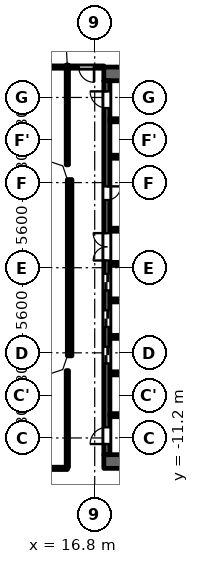
"""IFC4 building model, lengths in metres.
Left out: names, types, materials, properties, quantities, classifications, styles, units other than length and angle.
Written with IfcOpenShell. Run it as: python <this file> out.ifc"""

import sys

from ifc_helpers import new_model, si_unit, direction, frame, frame_2d, origin, place, context, subcontext, project, spatial, polyline, rectangle, outline, extrude, element, fill, save


model = new_model("IFC4")
c1 = context("Model", 3, precision=1e-05, world=origin(), true_north=direction((0.0, 1.0)))
c2 = subcontext(c1, "Body", "Model", "MODEL_VIEW")
j1 = project(units=[si_unit("LENGTHUNIT", "METRE"), si_unit("PLANEANGLEUNIT", "RADIAN")], contexts=[c1])
p1 = place(None, origin())
s1 = spatial("IfcSite", under=j1, at=p1, CompositionType="ELEMENT")
p2 = place(p1, origin())
s2 = spatial("IfcBuilding", under=s1, at=p2, CompositionType="ELEMENT")
p3 = place(p2, frame((0.0, 0.0, 6.5)))
s3 = spatial("IfcBuildingStorey", under=s2, at=p3, CompositionType="ELEMENT", Elevation=6.5)
p4 = place(p3, frame((15.15, 5.8, 0.0), z_axis=(0.0, 0.0, 1.0), x_axis=(0.0, -1.0, 0.0)))
e1 = element("IfcWall", 1, at=p4, inside=s3, PredefinedType="SOLIDWALL", context=c2, shape_type="SweptSolid", body=[
    extrude(rectangle(XDim=11.6, YDim=0.3, at=frame_2d((5.8, 0.0))), origin(), (0.0, 0.0, 1.0), 4.45),
])
for number, where, z_axis, x_axis in (
    (2, (17.4, 12.75, 0.0), (0.0, 0.0, 1.0), (1.0, 0.0, 0.0)),
    (3, (17.4, -12.75, 0.0), (0.0, 0.0, 1.0), (1.0, 0.0, 0.0)),
):
    element("IfcWall", number, at=place(p3, frame(where, z_axis=z_axis, x_axis=x_axis)), inside=s3, PredefinedType="SHEAR", context=c2, shape_type="SweptSolid", body=[
        extrude(rectangle(XDim=10.4, YDim=0.9, at=frame_2d((5.2, 0.0))), origin(), (0.0, 0.0, 1.0), 4.45),
    ])
p5 = place(p3, frame((17.6, -12.3, 0.0), z_axis=(0.0, 0.0, 1.0), x_axis=(0.0, 1.0, 0.0)))
e4 = element("IfcWall", 4, at=p5, inside=s3, PredefinedType="SHEAR", context=c2, shape_type="SweptSolid", body=[
    extrude(rectangle(XDim=24.6, YDim=0.4, at=frame_2d((12.3, 0.0))), origin(), (0.0, 0.0, 1.0), 4.45),
])
p6 = place(p5, frame((6.0, 0.0, 0.0)))
e5 = element("IfcOpeningElement", 5, at=p6, cuts=e4, PredefinedType="OPENING", context=c2, shape_type="SweptSolid", body=[
    extrude(rectangle(XDim=1.1, YDim=2.1, at=frame_2d((0.55, 1.05))), frame((0.0, 0.21, 0.0), z_axis=(0.0, -1.0, 0.0), x_axis=(1.0, 0.0, 0.0)), (0.0, 0.0, 1.0), 0.42),
])
p7 = place(p5, frame((8.4, 0.0, 0.0)))
e6 = element("IfcOpeningElement", 6, at=p7, cuts=e4, PredefinedType="OPENING", context=c2, shape_type="SweptSolid", body=[
    extrude(rectangle(XDim=1.1, YDim=2.1, at=frame_2d((0.55, 1.05))), frame((0.0, 0.21, 0.0), z_axis=(0.0, -1.0, 0.0), x_axis=(1.0, 0.0, 0.0)), (0.0, 0.0, 1.0), 0.42),
])
p8 = place(p5, frame((10.8, 0.0, 0.0)))
e7 = element("IfcOpeningElement", 7, at=p8, cuts=e4, PredefinedType="OPENING", context=c2, shape_type="SweptSolid", body=[
    extrude(rectangle(XDim=1.1, YDim=2.1, at=frame_2d((0.55, 1.05))), frame((0.0, 0.21, 0.0), z_axis=(0.0, -1.0, 0.0), x_axis=(1.0, 0.0, 0.0)), (0.0, 0.0, 1.0), 0.42),
])
p9 = place(p5, frame((16.75, 0.0, 0.0)))
e8 = element("IfcOpeningElement", 8, at=p9, cuts=e4, PredefinedType="OPENING", context=c2, shape_type="SweptSolid", body=[
    extrude(rectangle(XDim=0.9, YDim=2.1, at=frame_2d((0.45, 1.05))), frame((0.0, 0.21, 0.0), z_axis=(0.0, -1.0, 0.0), x_axis=(1.0, 0.0, 0.0)), (0.0, 0.0, 1.0), 0.42),
])
p10 = place(p5, frame((22.8, 0.0, 0.0)))
e9 = element("IfcOpeningElement", 9, at=p10, cuts=e4, PredefinedType="OPENING", context=c2, shape_type="SweptSolid", body=[
    extrude(rectangle(XDim=1.1, YDim=2.1, at=frame_2d((0.55, 1.05))), frame((0.0, 0.21, 0.0), z_axis=(0.0, -1.0, 0.0), x_axis=(1.0, 0.0, 0.0)), (0.0, 0.0, 1.0), 0.42),
])
p11 = place(p5, frame((0.7, 0.0, 0.0)))
e10 = element("IfcOpeningElement", 10, at=p11, cuts=e4, PredefinedType="OPENING", context=c2, shape_type="SweptSolid", body=[
    extrude(rectangle(XDim=1.1, YDim=2.1, at=frame_2d((0.55, 1.05))), frame((0.0, 0.21, 0.0), z_axis=(0.0, -1.0, 0.0), x_axis=(1.0, 0.0, 0.0)), (0.0, 0.0, 1.0), 0.42),
])
p12 = place(p5, frame((12.775, 0.0, 0.0)))
e11 = element("IfcOpeningElement", 11, at=p12, cuts=e4, PredefinedType="OPENING", context=c2, shape_type="SweptSolid", body=[
    extrude(rectangle(XDim=1.8, YDim=2.1, at=frame_2d((0.9, 1.05))), frame((0.0, 0.21, 0.0), z_axis=(0.0, -1.0, 0.0), x_axis=(1.0, 0.0, 0.0)), (0.0, 0.0, 1.0), 0.42),
])
p13 = place(p3, frame((17.8, -9.7, 0.0), z_axis=(0.0, 0.0, 1.0), x_axis=(1.0, 0.0, 0.0)))
e12 = element("IfcWall", 12, at=p13, inside=s3, PredefinedType="SHEAR", context=c2, shape_type="SweptSolid", body=[
    extrude(rectangle(XDim=8.3, YDim=0.2, at=frame_2d((4.15, 0.0))), origin(), (0.0, 0.0, 1.0), 4.45),
])
p14 = place(p13, frame((0.85, 0.0, 0.0)))
e13 = element("IfcOpeningElement", 13, at=p14, cuts=e12, PredefinedType="OPENING", context=c2, shape_type="SweptSolid", body=[
    extrude(rectangle(XDim=1.1, YDim=2.1, at=frame_2d((0.55, 1.05))), frame((0.0, 0.11, 0.0), z_axis=(0.0, -1.0, 0.0), x_axis=(1.0, 0.0, 0.0)), (0.0, 0.0, 1.0), 0.22),
])
p15 = place(p13, frame((3.75, 0.0, 0.0)))
e14 = element("IfcOpeningElement", 14, at=p15, cuts=e12, PredefinedType="OPENING", context=c2, shape_type="SweptSolid", body=[
    extrude(rectangle(XDim=1.1, YDim=2.1, at=frame_2d((0.55, 1.05))), frame((0.0, 0.11, 0.0), z_axis=(0.0, -1.0, 0.0), x_axis=(1.0, 0.0, 0.0)), (0.0, 0.0, 1.0), 0.22),
])
for number, where, z_axis, x_axis in (
    (15, (17.8, -6.95, 0.0), (0.0, 0.0, 1.0), (1.0, 0.0, 0.0)),
    (16, (17.8, -4.55, 0.0), (0.0, 0.0, 1.0), (1.0, 0.0, 0.0)),
    (17, (17.8, -2.15, 0.0), (0.0, 0.0, 1.0), (1.0, 0.0, 0.0)),
):
    element("IfcWall", number, at=place(p3, frame(where, z_axis=z_axis, x_axis=x_axis)), inside=s3, PredefinedType="PARTITIONING", context=c2, shape_type="SweptSolid", body=[
        extrude(rectangle(XDim=2.8, YDim=0.2, at=frame_2d((1.4, 0.0))), origin(), (0.0, 0.0, 1.0), 4.45),
    ])
for number, where, z_axis, x_axis in (
    (18, (17.8, 0.25, 0.0), (0.0, 0.0, 1.0), (1.0, 0.0, 0.0)),
    (19, (17.8, 2.5, 0.0), (0.0, 0.0, 1.0), (1.0, 0.0, 0.0)),
):
    element("IfcWall", number, at=place(p3, frame(where, z_axis=z_axis, x_axis=x_axis)), inside=s3, PredefinedType="PARTITIONING", context=c2, shape_type="SweptSolid", body=[
        extrude(rectangle(XDim=3.0, YDim=0.2, at=frame_2d((1.5, 0.0))), origin(), (0.0, 0.0, 1.0), 4.45),
    ])
p16 = place(p3, frame((17.8, 7.3, 0.0), z_axis=(0.0, 0.0, 1.0), x_axis=(1.0, 0.0, 0.0)))
e20 = element("IfcWall", 20, at=p16, inside=s3, PredefinedType="PARTITIONING", context=c2, shape_type="SweptSolid", body=[
    extrude(rectangle(XDim=2.8, YDim=0.2, at=frame_2d((1.4, 0.0))), origin(), (0.0, 0.0, 1.0), 4.45),
])
p17 = place(p3, frame((17.8, 9.7, 0.0), z_axis=(0.0, 0.0, 1.0), x_axis=(1.0, 0.0, 0.0)))
e21 = element("IfcWall", 21, at=p17, inside=s3, PredefinedType="SHEAR", context=c2, shape_type="SweptSolid", body=[
    extrude(rectangle(XDim=8.3, YDim=0.2, at=frame_2d((4.15, 0.0))), origin(), (0.0, 0.0, 1.0), 4.45),
])
p18 = place(p17, frame((0.85, 0.0, 0.0)))
e22 = element("IfcOpeningElement", 22, at=p18, cuts=e21, PredefinedType="OPENING", context=c2, shape_type="SweptSolid", body=[
    extrude(rectangle(XDim=1.1, YDim=2.1, at=frame_2d((0.55, 1.05))), frame((0.0, 0.11, 0.0), z_axis=(0.0, -1.0, 0.0), x_axis=(1.0, 0.0, 0.0)), (0.0, 0.0, 1.0), 0.22),
])
p19 = place(p17, frame((3.75, 0.0, 0.0)))
e23 = element("IfcOpeningElement", 23, at=p19, cuts=e21, PredefinedType="OPENING", context=c2, shape_type="SweptSolid", body=[
    extrude(rectangle(XDim=1.1, YDim=2.1, at=frame_2d((0.55, 1.05))), frame((0.0, 0.11, 0.0), z_axis=(0.0, -1.0, 0.0), x_axis=(1.0, 0.0, 0.0)), (0.0, 0.0, 1.0), 0.22),
])
p20 = place(p3, frame((-15.005, -13.2, 0.0), z_axis=(0.0, 0.0, 1.0), x_axis=(1.0, 0.0, 0.0)))
e24 = element("IfcWall", 24, at=p20, inside=s3, PredefinedType="PARTITIONING", context=c2, shape_type="SweptSolid", body=[
    extrude(rectangle(XDim=30.01, YDim=0.15, at=frame_2d((15.005, 0.0))), origin(), (0.0, 0.0, 1.0), 4.45),
])
p21 = place(p20, frame((16.855, 0.0, 0.0)))
e25 = element("IfcOpeningElement", 25, at=p21, cuts=e24, PredefinedType="OPENING", context=c2, shape_type="SweptSolid", body=[
    extrude(rectangle(XDim=1.8, YDim=2.1, at=frame_2d((0.9, 1.05))), frame((0.0, 0.085, 0.0), z_axis=(0.0, -1.0, 0.0), x_axis=(1.0, 0.0, 0.0)), (0.0, 0.0, 1.0), 0.17),
])
p22 = place(p3, frame((-17.4, 13.2, 0.0), z_axis=(0.0, 0.0, 1.0), x_axis=(1.0, 0.0, 0.0)))
e26 = element("IfcWall", 26, at=p22, inside=s3, PredefinedType="PARTITIONING", context=c2, shape_type="SweptSolid", body=[
    extrude(rectangle(XDim=34.8, YDim=0.15, at=frame_2d((17.4, 0.0))), origin(), (0.0, 0.0, 1.0), 4.45),
])
p23 = place(p22, frame((3.05, 0.0, 0.0)))
e27 = element("IfcOpeningElement", 27, at=p23, cuts=e26, PredefinedType="OPENING", context=c2, shape_type="SweptSolid", body=[
    extrude(rectangle(XDim=1.8, YDim=2.1, at=frame_2d((0.9, 1.05))), frame((0.0, 0.085, 0.0), z_axis=(0.0, -1.0, 0.0), x_axis=(1.0, 0.0, 0.0)), (0.0, 0.0, 1.0), 0.17),
])
p24 = place(p22, frame((0.75, 0.0, 0.0)))
e28 = element("IfcOpeningElement", 28, at=p24, cuts=e26, PredefinedType="OPENING", context=c2, shape_type="SweptSolid", body=[
    extrude(rectangle(XDim=1.0, YDim=2.1, at=frame_2d((0.5, 1.05))), frame((0.0, 0.085, 0.0), z_axis=(0.0, -1.0, 0.0), x_axis=(1.0, 0.0, 0.0)), (0.0, 0.0, 1.0), 0.17),
])
p25 = place(p22, frame((33.15, 0.0, 0.0)))
e29 = element("IfcOpeningElement", 29, at=p25, cuts=e26, PredefinedType="OPENING", context=c2, shape_type="SweptSolid", body=[
    extrude(rectangle(XDim=1.0, YDim=2.1, at=frame_2d((0.5, 1.05))), frame((0.0, 0.085, 0.0), z_axis=(0.0, -1.0, 0.0), x_axis=(1.0, 0.0, 0.0)), (0.0, 0.0, 1.0), 0.17),
])
for number, where, z_axis, x_axis in (
    (30, (15.0, -13.125, 0.0), (0.0, 0.0, 1.0), (0.0, 1.0, 0.0)),
    (31, (15.0, 6.769, 0.0), (0.0, 0.0, 1.0), (0.0, 1.0, 0.0)),
):
    element("IfcWall", number, at=place(p3, frame(where, z_axis=z_axis, x_axis=x_axis)), inside=s3, PredefinedType="PARTITIONING", context=c2, shape_type="SweptSolid", body=[
        extrude(rectangle(XDim=6.356, YDim=0.15, at=frame_2d((3.178, 0.0))), origin(), (0.0, 0.0, 1.0), 4.45),
    ])
p26 = place(p3, origin())
e32 = element("IfcWall", 32, at=p26, inside=s3, PredefinedType="SOLIDWALL", context=c2, shape_type="SweptSolid", body=[
    extrude(outline(polyline([(14.937, 6.937), (13.849, 7.3), (13.8, 7.3), (13.8, 7.0), (14.7, 6.7), (15.0, 5.8), (15.3, 5.8), (15.3, 5.849), (14.937, 6.937)])), origin(), (0.0, 0.0, 1.0), 4.45),
])
e33 = element("IfcWall", 33, at=p26, inside=s3, PredefinedType="SOLIDWALL", context=c2, shape_type="SweptSolid", body=[
    extrude(outline(polyline([(14.937, -6.937), (15.3, -5.849), (15.3, -5.8), (15.0, -5.8), (14.7, -6.7), (13.8, -7.0), (13.8, -7.3), (13.849, -7.3), (14.937, -6.937)])), origin(), (0.0, 0.0, 1.0), 4.45),
])
p27 = place(p6, origin())
e34 = element("IfcDoor", 34, at=p27, inside=s3, OperationType="DOUBLE_DOOR_SLIDING", PredefinedType="DOOR", context=c2, shape_type="SweptSolid", body=[
    extrude(rectangle(XDim=1.1, YDim=2.1, at=frame_2d((0.55, 1.05))), frame((0.0, 0.025, 0.0), z_axis=(0.0, -1.0, 0.0), x_axis=(1.0, 0.0, 0.0)), (0.0, 0.0, 1.0), 0.05),
])
fill(e5, e34)
p28 = place(p7, origin())
e35 = element("IfcDoor", 35, at=p28, inside=s3, OperationType="DOUBLE_DOOR_SLIDING", PredefinedType="DOOR", context=c2, shape_type="SweptSolid", body=[
    extrude(rectangle(XDim=1.1, YDim=2.1, at=frame_2d((0.55, 1.05))), frame((0.0, 0.025, 0.0), z_axis=(0.0, -1.0, 0.0), x_axis=(1.0, 0.0, 0.0)), (0.0, 0.0, 1.0), 0.05),
])
fill(e6, e35)
p29 = place(p8, origin())
e36 = element("IfcDoor", 36, at=p29, inside=s3, OperationType="DOUBLE_DOOR_SLIDING", PredefinedType="DOOR", context=c2, shape_type="SweptSolid", body=[
    extrude(rectangle(XDim=1.1, YDim=2.1, at=frame_2d((0.55, 1.05))), frame((0.0, 0.025, 0.0), z_axis=(0.0, -1.0, 0.0), x_axis=(1.0, 0.0, 0.0)), (0.0, 0.0, 1.0), 0.05),
])
fill(e7, e36)
p30 = place(p9, origin())
e37 = element("IfcDoor", 37, at=p30, inside=s3, OperationType="SINGLE_SWING_RIGHT", PredefinedType="DOOR", context=c2, shape_type="SweptSolid", body=[
    extrude(rectangle(XDim=0.9, YDim=2.1, at=frame_2d((0.45, 1.05))), frame((0.0, 0.025, 0.0), z_axis=(0.0, -1.0, 0.0), x_axis=(1.0, 0.0, 0.0)), (0.0, 0.0, 1.0), 0.05),
])
fill(e8, e37)
p31 = place(p10, origin())
e38 = element("IfcDoor", 38, at=p31, inside=s3, OperationType="SINGLE_SWING_LEFT", PredefinedType="DOOR", context=c2, shape_type="SweptSolid", body=[
    extrude(rectangle(XDim=1.1, YDim=2.1, at=frame_2d((0.55, 1.05))), frame((0.0, 0.025, 0.0), z_axis=(0.0, -1.0, 0.0), x_axis=(1.0, 0.0, 0.0)), (0.0, 0.0, 1.0), 0.05),
])
fill(e9, e38)
p32 = place(p11, origin())
e39 = element("IfcDoor", 39, at=p32, inside=s3, OperationType="SINGLE_SWING_RIGHT", PredefinedType="DOOR", context=c2, shape_type="SweptSolid", body=[
    extrude(rectangle(XDim=1.1, YDim=2.1, at=frame_2d((0.55, 1.05))), frame((0.0, 0.025, 0.0), z_axis=(0.0, -1.0, 0.0), x_axis=(1.0, 0.0, 0.0)), (0.0, 0.0, 1.0), 0.05),
])
fill(e10, e39)
p33 = place(p12, origin())
e40 = element("IfcDoor", 40, at=p33, inside=s3, OperationType="DOUBLE_DOOR_SINGLE_SWING", PredefinedType="DOOR", context=c2, shape_type="SweptSolid", body=[
    extrude(rectangle(XDim=1.8, YDim=2.1, at=frame_2d((0.9, 1.05))), frame((0.0, 0.025, 0.0), z_axis=(0.0, -1.0, 0.0), x_axis=(1.0, 0.0, 0.0)), (0.0, 0.0, 1.0), 0.05),
])
fill(e11, e40)
p34 = place(p25, origin())
e41 = element("IfcDoor", 41, at=p34, inside=s3, OperationType="SINGLE_SWING_RIGHT", PredefinedType="DOOR", context=c2, shape_type="SweptSolid", body=[
    extrude(rectangle(XDim=1.0, YDim=2.1, at=frame_2d((0.5, 1.05))), frame((0.0, 0.025, 0.0), z_axis=(0.0, -1.0, 0.0), x_axis=(1.0, 0.0, 0.0)), (0.0, 0.0, 1.0), 0.05),
])
fill(e29, e41)
save(model, sys.argv[1])
